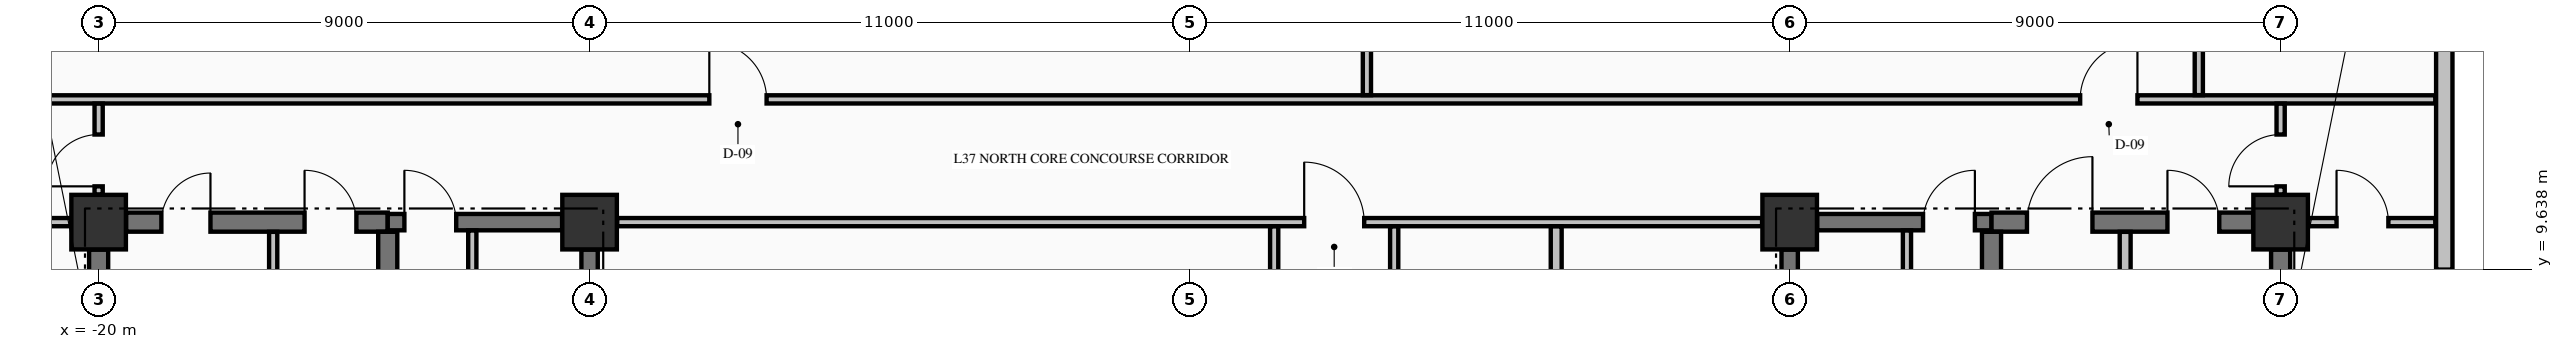
"""IFC4 building model, lengths in metres.
Left out: names, types, materials, properties, quantities, classifications, styles, units other than length and angle.
Written with IfcOpenShell. Run it as: python <this file> out.ifc"""

import sys

from ifc_helpers import new_model, si_unit, direction, frame, frame_2d, origin, origin_2d, place, context, subcontext, project, spatial, rectangle, extrude, element, fill, save


model = new_model("IFC4")
c1 = context("Model", 3, precision=1e-05, world=origin(), true_north=direction((0.0, 1.0)))
c2 = subcontext(c1, "Body", "Model", "MODEL_VIEW")
j1 = project(units=[si_unit("LENGTHUNIT", "METRE"), si_unit("PLANEANGLEUNIT", "RADIAN")], contexts=[c1])
p1 = place(None, origin())
s1 = spatial("IfcSite", under=j1, at=p1, CompositionType="ELEMENT")
p2 = place(p1, origin())
s2 = spatial("IfcBuilding", under=s1, at=p2, CompositionType="ELEMENT")
p3 = place(p2, frame((0.0, 0.0, 146.34)))
s3 = spatial("IfcBuildingStorey", under=s2, at=p3, CompositionType="ELEMENT", Elevation=146.34)
for number, where, z_axis, x_axis in (
    (1, (-20.0, 10.5, -0.25), (0.0, 0.0, 1.0), (1.0, 0.0, 0.0)),
    (2, (-11.0, 10.5, -0.25), (0.0, 0.0, 1.0), (1.0, 0.0, 0.0)),
    (3, (11.0, 10.5, -0.25), (0.0, 0.0, 1.0), (1.0, 0.0, 0.0)),
    (4, (20.0, 10.5, -0.25), (0.0, 0.0, 1.0), (1.0, 0.0, 0.0)),
):
    element("IfcColumn", number, at=place(p3, frame(where, z_axis=z_axis, x_axis=x_axis)), inside=s3, PredefinedType="COLUMN", context=c2, shape_type="SweptSolid", body=[
        extrude(rectangle(XDim=1.0, YDim=1.0, at=origin_2d()), origin(), (0.0, 0.0, 1.0), 3.57),
    ])
p4 = place(p3, frame((23.0, 9.63, 0.0), z_axis=(0.0, 0.0, 1.0), x_axis=(0.0, 1.0, 0.0)))
e5 = element("IfcWall", 5, at=p4, inside=s3, PredefinedType="STANDARD", context=c2, shape_type="SweptSolid", body=[
    extrude(rectangle(XDim=10.74, YDim=0.3, at=frame_2d((5.37, 0.0))), origin(), (0.0, 0.0, 1.0), 2.712),
])
p5 = place(p3, frame((-19.496, 10.5, 0.0), z_axis=(0.0, 0.0, 1.0), x_axis=(1.0, 0.0, 0.0)))
e6 = element("IfcWall", 6, at=p5, inside=s3, PredefinedType="SHEAR", context=c2, shape_type="SweptSolid", body=[
    extrude(rectangle(XDim=4.796, YDim=0.35, at=frame_2d((2.398, 0.0))), origin(), (0.0, 0.0, 1.0), 3.32),
])
p6 = place(p5, frame((0.646, 0.0, 0.0)))
e7 = element("IfcOpeningElement", 7, at=p6, cuts=e6, PredefinedType="OPENING", context=c2, shape_type="SweptSolid", body=[
    extrude(rectangle(XDim=0.9, YDim=2.15, at=frame_2d((0.45, 1.075))), frame((0.0, 0.185, 0.0), z_axis=(0.0, -1.0, 0.0), x_axis=(1.0, 0.0, 0.0)), (0.0, 0.0, 1.0), 0.37),
])
p7 = place(p5, frame((3.271, 0.0, 0.0)))
e8 = element("IfcOpeningElement", 8, at=p7, cuts=e6, PredefinedType="OPENING", context=c2, shape_type="SweptSolid", body=[
    extrude(rectangle(XDim=0.95, YDim=2.15, at=frame_2d((0.475, 1.075))), frame((0.0, 0.185, 0.0), z_axis=(0.0, -1.0, 0.0), x_axis=(1.0, 0.0, 0.0)), (0.0, 0.0, 1.0), 0.37),
])
p8 = place(p3, frame((-14.7, 10.5, 0.0), z_axis=(0.0, 0.0, 1.0), x_axis=(1.0, 0.0, 0.0)))
e9 = element("IfcWall", 9, at=p8, inside=s3, PredefinedType="SHEAR", context=c2, shape_type="SweptSolid", body=[
    extrude(rectangle(XDim=3.196, YDim=0.3, at=frame_2d((1.598, 0.0))), origin(), (0.0, 0.0, 1.0), 3.32),
])
p9 = place(p8, frame((0.305, 0.0, 0.0)))
e10 = element("IfcOpeningElement", 10, at=p9, cuts=e9, PredefinedType="OPENING", context=c2, shape_type="SweptSolid", body=[
    extrude(rectangle(XDim=0.95, YDim=2.15, at=frame_2d((0.475, 1.075))), frame((0.0, 0.16, 0.0), z_axis=(0.0, -1.0, 0.0), x_axis=(1.0, 0.0, 0.0)), (0.0, 0.0, 1.0), 0.32),
])
p10 = place(p3, frame((11.504, 10.5, 0.0), z_axis=(0.0, 0.0, 1.0), x_axis=(1.0, 0.0, 0.0)))
e11 = element("IfcWall", 11, at=p10, inside=s3, PredefinedType="SHEAR", context=c2, shape_type="SweptSolid", body=[
    extrude(rectangle(XDim=3.196, YDim=0.3, at=frame_2d((1.598, 0.0))), origin(), (0.0, 0.0, 1.0), 3.32),
])
p11 = place(p10, frame((1.941, 0.0, 0.0)))
e12 = element("IfcOpeningElement", 12, at=p11, cuts=e11, PredefinedType="OPENING", context=c2, shape_type="SweptSolid", body=[
    extrude(rectangle(XDim=0.95, YDim=2.15, at=frame_2d((0.475, 1.075))), frame((0.0, 0.16, 0.0), z_axis=(0.0, -1.0, 0.0), x_axis=(1.0, 0.0, 0.0)), (0.0, 0.0, 1.0), 0.32),
])
p12 = place(p3, frame((14.7, 10.5, 0.0), z_axis=(0.0, 0.0, 1.0), x_axis=(1.0, 0.0, 0.0)))
e13 = element("IfcWall", 13, at=p12, inside=s3, PredefinedType="SHEAR", context=c2, shape_type="SweptSolid", body=[
    extrude(rectangle(XDim=4.796, YDim=0.35, at=frame_2d((2.398, 0.0))), origin(), (0.0, 0.0, 1.0), 3.32),
])
p13 = place(p12, frame((0.65, 0.0, 0.0)))
e14 = element("IfcOpeningElement", 14, at=p13, cuts=e13, PredefinedType="OPENING", context=c2, shape_type="SweptSolid", body=[
    extrude(rectangle(XDim=1.2, YDim=2.15, at=frame_2d((0.6, 1.075))), frame((0.0, 0.185, 0.0), z_axis=(0.0, -1.0, 0.0), x_axis=(1.0, 0.0, 0.0)), (0.0, 0.0, 1.0), 0.37),
])
p14 = place(p12, frame((3.225, 0.0, 0.0)))
e15 = element("IfcOpeningElement", 15, at=p14, cuts=e13, PredefinedType="OPENING", context=c2, shape_type="SweptSolid", body=[
    extrude(rectangle(XDim=0.95, YDim=2.15, at=frame_2d((0.475, 1.075))), frame((0.0, 0.185, 0.0), z_axis=(0.0, -1.0, 0.0), x_axis=(1.0, 0.0, 0.0)), (0.0, 0.0, 1.0), 0.37),
])
p15 = place(p3, frame((-27.835, 10.5, 0.0), z_axis=(0.0, 0.0, 1.0), x_axis=(1.0, 0.0, 0.0)))
e16 = element("IfcWall", 16, at=p15, inside=s3, PredefinedType="PARTITIONING", context=c2, shape_type="SweptSolid", body=[
    extrude(rectangle(XDim=7.329, YDim=0.15, at=frame_2d((3.665, 0.0))), origin(), (0.0, 0.0, 1.0), 3.32),
])
p16 = place(p15, frame((3.335, 0.0, 0.0)))
e17 = element("IfcOpeningElement", 17, at=p16, cuts=e16, PredefinedType="OPENING", context=c2, shape_type="SweptSolid", body=[
    extrude(rectangle(XDim=1.0, YDim=2.15, at=frame_2d((0.5, 1.075))), frame((0.0, 0.085, 0.0), z_axis=(0.0, -1.0, 0.0), x_axis=(1.0, 0.0, 0.0)), (0.0, 0.0, 1.0), 0.17),
])
p17 = place(p3, frame((-10.494, 10.5, 0.0), z_axis=(0.0, 0.0, 1.0), x_axis=(1.0, 0.0, 0.0)))
e18 = element("IfcWall", 18, at=p17, inside=s3, PredefinedType="PARTITIONING", context=c2, shape_type="SweptSolid", body=[
    extrude(rectangle(XDim=20.988, YDim=0.15, at=frame_2d((10.494, 0.0))), origin(), (0.0, 0.0, 1.0), 3.32),
])
p18 = place(p17, frame((12.594, 0.0, 0.0)))
e19 = element("IfcOpeningElement", 19, at=p18, cuts=e18, PredefinedType="OPENING", context=c2, shape_type="SweptSolid", body=[
    extrude(rectangle(XDim=1.1, YDim=2.15, at=frame_2d((0.55, 1.075))), frame((0.0, 0.085, 0.0), z_axis=(0.0, -1.0, 0.0), x_axis=(1.0, 0.0, 0.0)), (0.0, 0.0, 1.0), 0.17),
])
p19 = place(p3, frame((20.506, 10.5, 0.0), z_axis=(0.0, 0.0, 1.0), x_axis=(1.0, 0.0, 0.0)))
e20 = element("IfcWall", 20, at=p19, inside=s3, PredefinedType="PARTITIONING", context=c2, shape_type="SweptSolid", body=[
    extrude(rectangle(XDim=2.329, YDim=0.15, at=frame_2d((1.165, 0.0))), origin(), (0.0, 0.0, 1.0), 3.32),
])
p20 = place(p19, frame((0.519, 0.0, 0.0)))
e21 = element("IfcOpeningElement", 21, at=p20, cuts=e20, PredefinedType="OPENING", context=c2, shape_type="SweptSolid", body=[
    extrude(rectangle(XDim=0.95, YDim=2.15, at=frame_2d((0.475, 1.075))), frame((0.0, 0.085, 0.0), z_axis=(0.0, -1.0, 0.0), x_axis=(1.0, 0.0, 0.0)), (0.0, 0.0, 1.0), 0.17),
])
p21 = place(p3, frame((-27.835, 12.75, 0.0), z_axis=(0.0, 0.0, 1.0), x_axis=(1.0, 0.0, 0.0)))
e22 = element("IfcWall", 22, at=p21, inside=s3, PredefinedType="PARTITIONING", context=c2, shape_type="SweptSolid", body=[
    extrude(rectangle(XDim=50.67, YDim=0.15, at=frame_2d((25.335, 0.0))), origin(), (0.0, 0.0, 1.0), 3.32),
])
p22 = place(p21, frame((19.03, 0.0, 0.0)))
e23 = element("IfcOpeningElement", 23, at=p22, cuts=e22, PredefinedType="OPENING", context=c2, shape_type="SweptSolid", body=[
    extrude(rectangle(XDim=1.05, YDim=2.15, at=frame_2d((0.525, 1.075))), frame((0.0, 0.085, 0.0), z_axis=(0.0, -1.0, 0.0), x_axis=(1.0, 0.0, 0.0)), (0.0, 0.0, 1.0), 0.17),
])
p23 = place(p21, frame((44.16, 0.0, 0.0)))
e24 = element("IfcOpeningElement", 24, at=p23, cuts=e22, PredefinedType="OPENING", context=c2, shape_type="SweptSolid", body=[
    extrude(rectangle(XDim=1.05, YDim=2.15, at=frame_2d((0.525, 1.075))), frame((0.0, 0.085, 0.0), z_axis=(0.0, -1.0, 0.0), x_axis=(1.0, 0.0, 0.0)), (0.0, 0.0, 1.0), 0.17),
])
p24 = place(p3, frame((-20.0, 0.504, 0.0), z_axis=(0.0, 0.0, 1.0), x_axis=(0.0, 1.0, 0.0)))
e25 = element("IfcWall", 25, at=p24, inside=s3, PredefinedType="SHEAR", context=c2, shape_type="SweptSolid", body=[
    extrude(rectangle(XDim=9.492, YDim=0.35, at=frame_2d((4.746, 0.0))), origin(), (0.0, 0.0, 1.0), 3.32),
])
p25 = place(p3, frame((-14.7, 5.852, 0.0), z_axis=(0.0, 0.0, 1.0), x_axis=(0.0, 1.0, 0.0)))
e26 = element("IfcWall", 26, at=p25, inside=s3, PredefinedType="SHEAR", context=c2, shape_type="SweptSolid", body=[
    extrude(rectangle(XDim=4.471, YDim=0.35, at=frame_2d((2.235, 0.0))), origin(), (0.0, 0.0, 1.0), 3.32),
])
for number, where, z_axis, x_axis in (
    (27, (-11.0, 5.852, 0.0), (0.0, 0.0, 1.0), (0.0, 1.0, 0.0)),
    (28, (11.0, 5.852, 0.0), (0.0, 0.0, 1.0), (0.0, 1.0, 0.0)),
):
    element("IfcWall", number, at=place(p3, frame(where, z_axis=z_axis, x_axis=x_axis)), inside=s3, PredefinedType="SHEAR", context=c2, shape_type="SweptSolid", body=[
        extrude(rectangle(XDim=4.144, YDim=0.3, at=frame_2d((2.072, 0.0))), origin(), (0.0, 0.0, 1.0), 3.32),
    ])
p26 = place(p3, frame((14.7, 5.852, 0.0), z_axis=(0.0, 0.0, 1.0), x_axis=(0.0, 1.0, 0.0)))
e29 = element("IfcWall", 29, at=p26, inside=s3, PredefinedType="SHEAR", context=c2, shape_type="SweptSolid", body=[
    extrude(rectangle(XDim=4.471, YDim=0.35, at=frame_2d((2.235, 0.0))), origin(), (0.0, 0.0, 1.0), 3.32),
])
p27 = place(p3, frame((20.0, 5.377, 0.0), z_axis=(0.0, 0.0, 1.0), x_axis=(0.0, 1.0, 0.0)))
e30 = element("IfcWall", 30, at=p27, inside=s3, PredefinedType="SHEAR", context=c2, shape_type="SweptSolid", body=[
    extrude(rectangle(XDim=4.619, YDim=0.35, at=frame_2d((2.31, 0.0))), origin(), (0.0, 0.0, 1.0), 3.32),
])
p28 = place(p3, frame((-20.0, 11.006, 0.0), z_axis=(0.0, 0.0, 1.0), x_axis=(0.0, 1.0, 0.0)))
e31 = element("IfcWall", 31, at=p28, inside=s3, PredefinedType="PARTITIONING", context=c2, shape_type="SweptSolid", body=[
    extrude(rectangle(XDim=1.666, YDim=0.15, at=frame_2d((0.833, 0.0))), origin(), (0.0, 0.0, 1.0), 2.81),
])
p29 = place(p28, frame((0.15, 0.0, 0.0)))
e32 = element("IfcOpeningElement", 32, at=p29, cuts=e31, PredefinedType="OPENING", context=c2, shape_type="SweptSolid", body=[
    extrude(rectangle(XDim=0.95, YDim=2.15, at=frame_2d((0.475, 1.075))), frame((0.0, 0.085, 0.0), z_axis=(0.0, -1.0, 0.0), x_axis=(1.0, 0.0, 0.0)), (0.0, 0.0, 1.0), 0.17),
])
p30 = place(p3, frame((-16.8, 4.878, 0.0), z_axis=(0.0, 0.0, 1.0), x_axis=(0.0, 1.0, 0.0)))
e33 = element("IfcWall", 33, at=p30, inside=s3, PredefinedType="PARTITIONING", context=c2, shape_type="SweptSolid", body=[
    extrude(rectangle(XDim=5.444, YDim=0.15, at=frame_2d((2.722, 0.0))), origin(), (0.0, 0.0, 1.0), 3.32),
])
p31 = place(p3, frame((-13.15, 7.228, 0.0), z_axis=(0.0, 0.0, 1.0), x_axis=(0.0, 1.0, 0.0)))
e34 = element("IfcWall", 34, at=p31, inside=s3, PredefinedType="PARTITIONING", context=c2, shape_type="SweptSolid", body=[
    extrude(rectangle(XDim=3.119, YDim=0.15, at=frame_2d((1.56, 0.0))), origin(), (0.0, 0.0, 1.0), 3.32),
])
p32 = place(p31, frame((1.097, 0.0, 0.0)))
e35 = element("IfcOpeningElement", 35, at=p32, cuts=e34, PredefinedType="OPENING", context=c2, shape_type="SweptSolid", body=[
    extrude(rectangle(XDim=0.95, YDim=2.15, at=frame_2d((0.475, 1.075))), frame((0.0, 0.085, 0.0), z_axis=(0.0, -1.0, 0.0), x_axis=(1.0, 0.0, 0.0)), (0.0, 0.0, 1.0), 0.17),
])
p33 = place(p3, frame((1.55, 2.978, 0.0), z_axis=(0.0, 0.0, 1.0), x_axis=(0.0, 1.0, 0.0)))
e36 = element("IfcWall", 36, at=p33, inside=s3, PredefinedType="PARTITIONING", context=c2, shape_type="SweptSolid", body=[
    extrude(rectangle(XDim=7.444, YDim=0.15, at=frame_2d((3.722, 0.0))), origin(), (0.0, 0.0, 1.0), 3.32),
])
p34 = place(p3, frame((3.25, 12.828, 0.0), z_axis=(0.0, 0.0, 1.0), x_axis=(0.0, 1.0, 0.0)))
e37 = element("IfcWall", 37, at=p34, inside=s3, PredefinedType="PARTITIONING", context=c2, shape_type="SweptSolid", body=[
    extrude(rectangle(XDim=12.612, YDim=0.15, at=frame_2d((6.306, 0.0))), origin(), (0.0, 0.0, 1.0), 3.32),
])
p35 = place(p3, frame((3.75, 2.978, 0.0), z_axis=(0.0, 0.0, 1.0), x_axis=(0.0, 1.0, 0.0)))
e38 = element("IfcWall", 38, at=p35, inside=s3, PredefinedType="PARTITIONING", context=c2, shape_type="SweptSolid", body=[
    extrude(rectangle(XDim=7.444, YDim=0.15, at=frame_2d((3.722, 0.0))), origin(), (0.0, 0.0, 1.0), 3.32),
])
p36 = place(p3, frame((6.72, 2.978, 0.0), z_axis=(0.0, 0.0, 1.0), x_axis=(0.0, 1.0, 0.0)))
e39 = element("IfcWall", 39, at=p36, inside=s3, PredefinedType="PARTITIONING", context=c2, shape_type="SweptSolid", body=[
    extrude(rectangle(XDim=7.444, YDim=0.2, at=frame_2d((3.722, 0.0))), origin(), (0.0, 0.0, 1.0), 3.32),
])
p37 = place(p3, frame((13.15, 7.228, 0.0), z_axis=(0.0, 0.0, 1.0), x_axis=(0.0, 1.0, 0.0)))
e40 = element("IfcWall", 40, at=p37, inside=s3, PredefinedType="PARTITIONING", context=c2, shape_type="SweptSolid", body=[
    extrude(rectangle(XDim=3.119, YDim=0.15, at=frame_2d((1.56, 0.0))), origin(), (0.0, 0.0, 1.0), 3.32),
])
p38 = place(p37, frame((1.097, 0.0, 0.0)))
e41 = element("IfcOpeningElement", 41, at=p38, cuts=e40, PredefinedType="OPENING", context=c2, shape_type="SweptSolid", body=[
    extrude(rectangle(XDim=0.95, YDim=2.15, at=frame_2d((0.475, 1.075))), frame((0.0, 0.085, 0.0), z_axis=(0.0, -1.0, 0.0), x_axis=(1.0, 0.0, 0.0)), (0.0, 0.0, 1.0), 0.17),
])
p39 = place(p3, frame((17.15, 7.928, 0.0), z_axis=(0.0, 0.0, 1.0), x_axis=(0.0, 1.0, 0.0)))
e42 = element("IfcWall", 42, at=p39, inside=s3, PredefinedType="PARTITIONING", context=c2, shape_type="SweptSolid", body=[
    extrude(rectangle(XDim=2.394, YDim=0.2, at=frame_2d((1.197, 0.0))), origin(), (0.0, 0.0, 1.0), 3.32),
])
p40 = place(p3, frame((18.5, 12.828, 0.0), z_axis=(0.0, 0.0, 1.0), x_axis=(0.0, 1.0, 0.0)))
e43 = element("IfcWall", 43, at=p40, inside=s3, PredefinedType="PARTITIONING", context=c2, shape_type="SweptSolid", body=[
    extrude(rectangle(XDim=7.566, YDim=0.15, at=frame_2d((3.783, 0.0))), origin(), (0.0, 0.0, 1.0), 3.32),
])
p41 = place(p3, frame((20.0, 11.006, 0.0), z_axis=(0.0, 0.0, 1.0), x_axis=(0.0, 1.0, 0.0)))
e44 = element("IfcWall", 44, at=p41, inside=s3, PredefinedType="PARTITIONING", context=c2, shape_type="SweptSolid", body=[
    extrude(rectangle(XDim=1.666, YDim=0.15, at=frame_2d((0.833, 0.0))), origin(), (0.0, 0.0, 1.0), 2.81),
])
p42 = place(p41, frame((0.15, 0.0, 0.0)))
e45 = element("IfcOpeningElement", 45, at=p42, cuts=e44, PredefinedType="OPENING", context=c2, shape_type="SweptSolid", body=[
    extrude(rectangle(XDim=0.95, YDim=2.15, at=frame_2d((0.475, 1.075))), frame((0.0, 0.085, 0.0), z_axis=(0.0, -1.0, 0.0), x_axis=(1.0, 0.0, 0.0)), (0.0, 0.0, 1.0), 0.17),
])
p43 = place(p9, origin())
e46 = element("IfcDoor", 46, at=p43, inside=s3, OperationType="SINGLE_SWING_LEFT", PredefinedType="DOOR", context=c2, shape_type="SweptSolid", body=[
    extrude(rectangle(XDim=0.95, YDim=2.15, at=frame_2d((0.475, 1.075))), frame((0.0, 0.025, 0.0), z_axis=(0.0, -1.0, 0.0), x_axis=(1.0, 0.0, 0.0)), (0.0, 0.0, 1.0), 0.05),
])
fill(e10, e46)
p44 = place(p11, origin())
e47 = element("IfcDoor", 47, at=p44, inside=s3, OperationType="SINGLE_SWING_RIGHT", PredefinedType="DOOR", context=c2, shape_type="SweptSolid", body=[
    extrude(rectangle(XDim=0.95, YDim=2.15, at=frame_2d((0.475, 1.075))), frame((0.0, 0.025, 0.0), z_axis=(0.0, -1.0, 0.0), x_axis=(1.0, 0.0, 0.0)), (0.0, 0.0, 1.0), 0.05),
])
fill(e12, e47)
p45 = place(p6, origin())
e48 = element("IfcDoor", 48, at=p45, inside=s3, OperationType="SINGLE_SWING_RIGHT", PredefinedType="DOOR", context=c2, shape_type="SweptSolid", body=[
    extrude(rectangle(XDim=0.9, YDim=2.15, at=frame_2d((0.45, 1.075))), frame((0.0, 0.025, 0.0), z_axis=(0.0, -1.0, 0.0), x_axis=(1.0, 0.0, 0.0)), (0.0, 0.0, 1.0), 0.05),
])
fill(e7, e48)
p46 = place(p7, origin())
e49 = element("IfcDoor", 49, at=p46, inside=s3, OperationType="SINGLE_SWING_LEFT", PredefinedType="DOOR", context=c2, shape_type="SweptSolid", body=[
    extrude(rectangle(XDim=0.95, YDim=2.15, at=frame_2d((0.475, 1.075))), frame((0.0, 0.025, 0.0), z_axis=(0.0, -1.0, 0.0), x_axis=(1.0, 0.0, 0.0)), (0.0, 0.0, 1.0), 0.05),
])
fill(e8, e49)
p47 = place(p13, origin())
e50 = element("IfcDoor", 50, at=p47, inside=s3, OperationType="SINGLE_SWING_RIGHT", PredefinedType="DOOR", context=c2, shape_type="SweptSolid", body=[
    extrude(rectangle(XDim=1.2, YDim=2.15, at=frame_2d((0.6, 1.075))), frame((0.0, 0.025, 0.0), z_axis=(0.0, -1.0, 0.0), x_axis=(1.0, 0.0, 0.0)), (0.0, 0.0, 1.0), 0.05),
])
fill(e14, e50)
p48 = place(p14, origin())
e51 = element("IfcDoor", 51, at=p48, inside=s3, OperationType="SINGLE_SWING_LEFT", PredefinedType="DOOR", context=c2, shape_type="SweptSolid", body=[
    extrude(rectangle(XDim=0.95, YDim=2.15, at=frame_2d((0.475, 1.075))), frame((0.0, 0.025, 0.0), z_axis=(0.0, -1.0, 0.0), x_axis=(1.0, 0.0, 0.0)), (0.0, 0.0, 1.0), 0.05),
])
fill(e15, e51)
p49 = place(p18, origin())
e52 = element("IfcDoor", 52, at=p49, inside=s3, OperationType="SINGLE_SWING_LEFT", PredefinedType="DOOR", context=c2, shape_type="SweptSolid", body=[
    extrude(rectangle(XDim=1.1, YDim=2.15, at=frame_2d((0.55, 1.075))), frame((0.0, 0.025, 0.0), z_axis=(0.0, -1.0, 0.0), x_axis=(1.0, 0.0, 0.0)), (0.0, 0.0, 1.0), 0.05),
])
fill(e19, e52)
p50 = place(p22, origin())
e53 = element("IfcDoor", 53, at=p50, inside=s3, OperationType="SINGLE_SWING_LEFT", PredefinedType="DOOR", context=c2, shape_type="SweptSolid", body=[
    extrude(rectangle(XDim=1.05, YDim=2.15, at=frame_2d((0.525, 1.075))), frame((0.0, 0.025, 0.0), z_axis=(0.0, -1.0, 0.0), x_axis=(1.0, 0.0, 0.0)), (0.0, 0.0, 1.0), 0.05),
])
fill(e23, e53)
p51 = place(p23, origin())
e54 = element("IfcDoor", 54, at=p51, inside=s3, OperationType="SINGLE_SWING_RIGHT", PredefinedType="DOOR", context=c2, shape_type="SweptSolid", body=[
    extrude(rectangle(XDim=1.05, YDim=2.15, at=frame_2d((0.525, 1.075))), frame((0.0, 0.025, 0.0), z_axis=(0.0, -1.0, 0.0), x_axis=(1.0, 0.0, 0.0)), (0.0, 0.0, 1.0), 0.05),
])
fill(e24, e54)
p52 = place(p29, origin())
e55 = element("IfcDoor", 55, at=p52, inside=s3, OperationType="SINGLE_SWING_LEFT", PredefinedType="DOOR", context=c2, shape_type="SweptSolid", body=[
    extrude(rectangle(XDim=0.95, YDim=2.15, at=frame_2d((0.475, 1.075))), frame((0.0, 0.025, 0.0), z_axis=(0.0, -1.0, 0.0), x_axis=(1.0, 0.0, 0.0)), (0.0, 0.0, 1.0), 0.05),
])
fill(e32, e55)
p53 = place(p42, origin())
e56 = element("IfcDoor", 56, at=p53, inside=s3, OperationType="SINGLE_SWING_LEFT", PredefinedType="DOOR", context=c2, shape_type="SweptSolid", body=[
    extrude(rectangle(XDim=0.95, YDim=2.15, at=frame_2d((0.475, 1.075))), frame((0.0, 0.025, 0.0), z_axis=(0.0, -1.0, 0.0), x_axis=(1.0, 0.0, 0.0)), (0.0, 0.0, 1.0), 0.05),
])
fill(e45, e56)
p54 = place(p20, origin())
e57 = element("IfcDoor", 57, at=p54, inside=s3, OperationType="SINGLE_SWING_LEFT", PredefinedType="DOOR", context=c2, shape_type="SweptSolid", body=[
    extrude(rectangle(XDim=0.95, YDim=2.15, at=frame_2d((0.475, 1.075))), frame((0.0, 0.025, 0.0), z_axis=(0.0, -1.0, 0.0), x_axis=(1.0, 0.0, 0.0)), (0.0, 0.0, 1.0), 0.05),
])
fill(e21, e57)
save(model, sys.argv[1])
